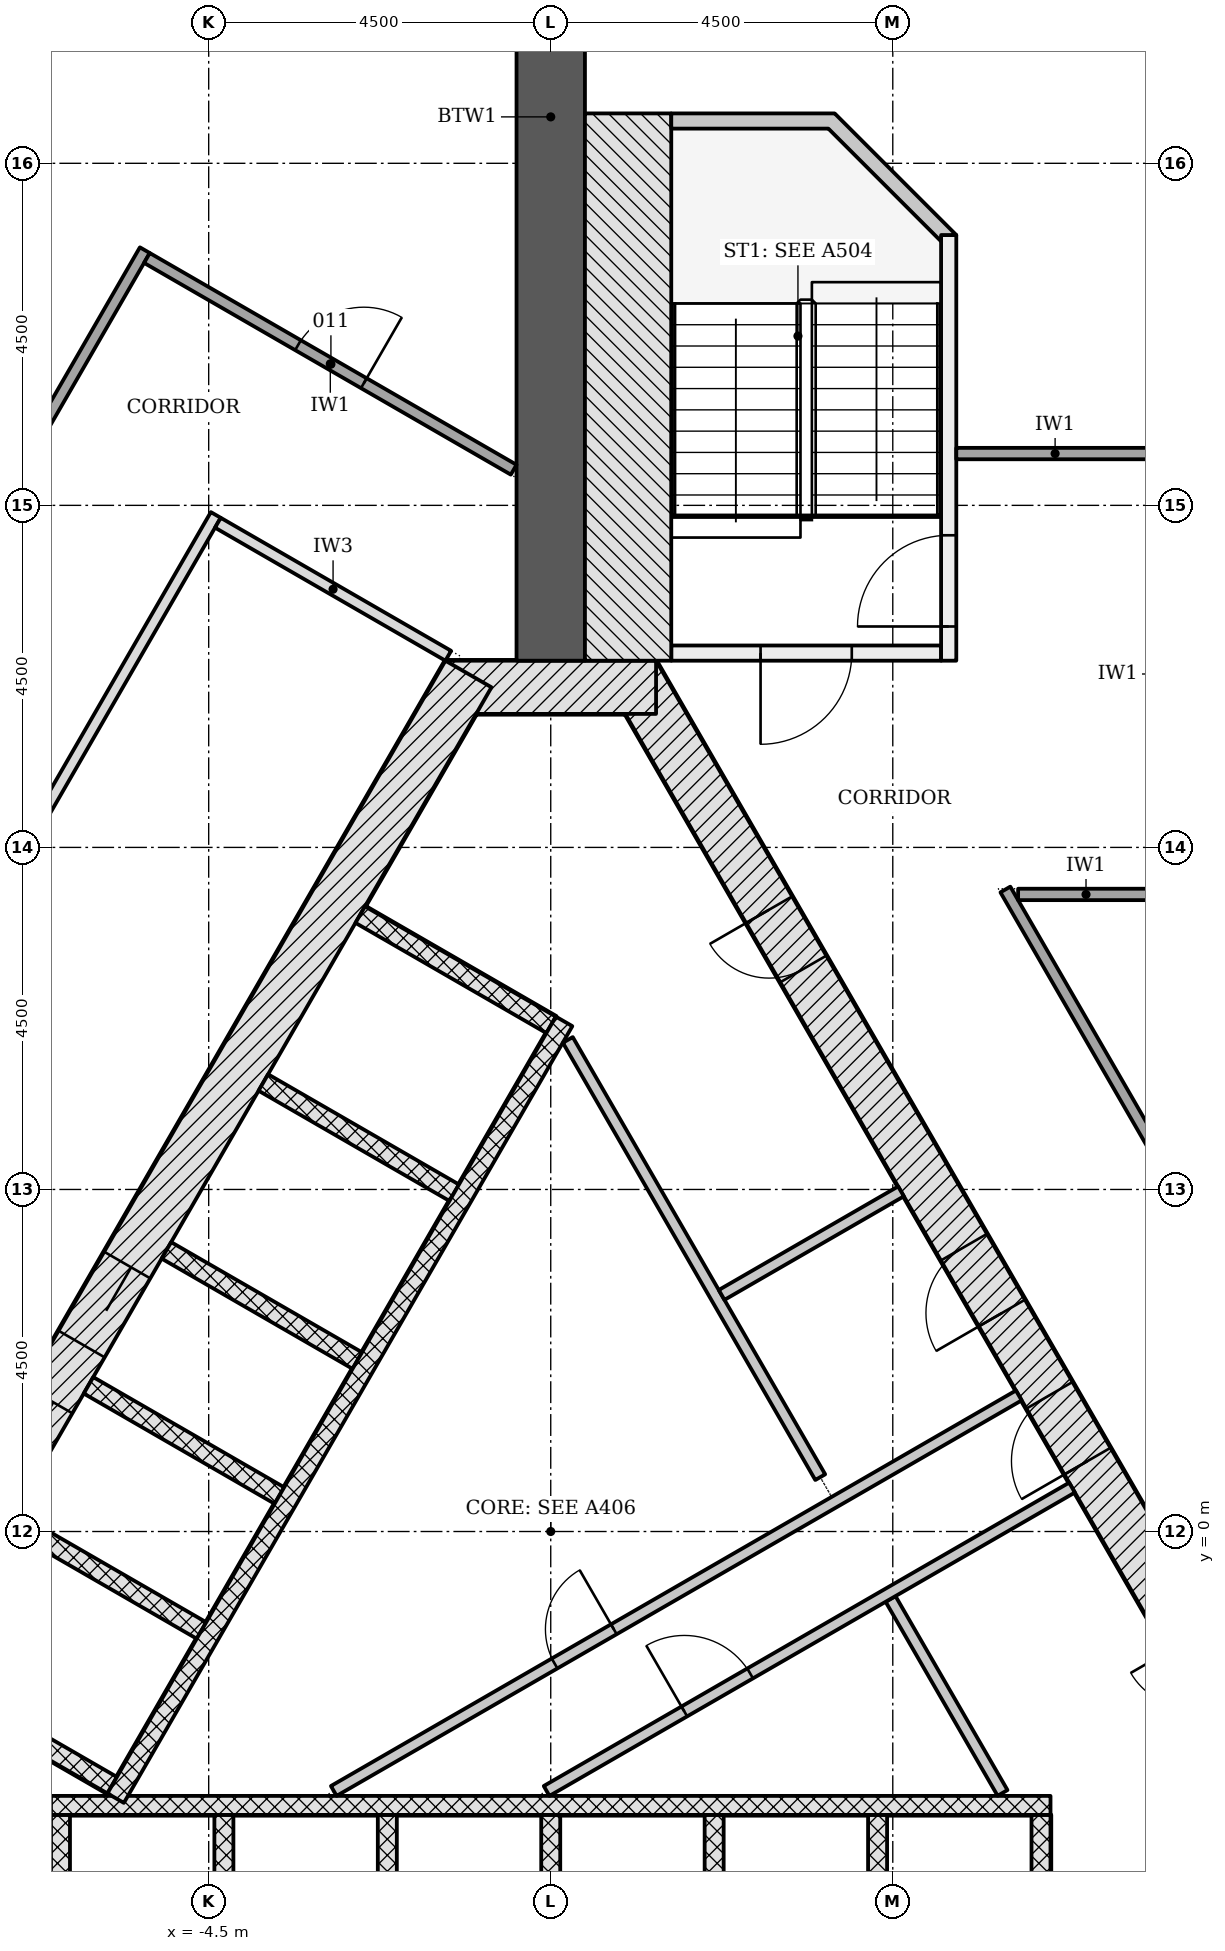
"""IFC4 building model, lengths in metres.
Left out: names, types, materials, properties, quantities, classifications, styles, units other than length and angle.
Written with IfcOpenShell. Run it as: python <this file> out.ifc"""

import sys

from ifc_helpers import new_model, si_unit, direction, frame, frame_2d, origin, place, context, subcontext, project, spatial, polyline, rectangle, outline, extrude, element, fill, save


model = new_model("IFC4")
c1 = context("Model", 3, precision=1e-05, world=origin(), true_north=direction((0.0, 1.0)))
c2 = subcontext(c1, "Body", "Model", "MODEL_VIEW")
j1 = project(units=[si_unit("LENGTHUNIT", "METRE"), si_unit("PLANEANGLEUNIT", "RADIAN")], contexts=[c1])
p1 = place(None, origin())
s1 = spatial("IfcSite", under=j1, at=p1, CompositionType="ELEMENT")
p2 = place(p1, origin())
s2 = spatial("IfcBuilding", under=s1, at=p2, CompositionType="ELEMENT")
p3 = place(p2, frame((0.0, 0.0, 34.8)))
s3 = spatial("IfcBuildingStorey", under=s2, at=p3, CompositionType="ELEMENT", Elevation=34.8)
p4 = place(p3, frame((10.311, -4.703, -0.2), z_axis=(0.0, 0.0, 1.0), x_axis=(-0.500001446645, 0.866024568562, 0.0)))
e1 = element("IfcWall", 1, at=p4, inside=s3, PredefinedType="SHEAR", context=c2, shape_type="SweptSolid", body=[
    extrude(rectangle(XDim=18.458, YDim=0.7, at=frame_2d((9.229, 0.0))), origin(), (0.0, 0.0, 1.0), 3.6),
])
p5 = place(p4, frame((6.5, 0.0, 0.2)))
e2 = element("IfcOpeningElement", 2, at=p5, cuts=e1, PredefinedType="OPENING", context=c2, shape_type="SweptSolid", body=[
    extrude(rectangle(XDim=1.0, YDim=2.1, at=frame_2d((0.5, 1.05))), frame((0.0, 0.36, 0.0), z_axis=(0.0, -1.0, 0.0), x_axis=(1.0, 0.0, 0.0)), (0.0, 0.0, 1.0), 0.72),
])
p6 = place(p4, frame((2.902, 0.0, 0.2)))
e3 = element("IfcOpeningElement", 3, at=p6, cuts=e1, PredefinedType="OPENING", context=c2, shape_type="SweptSolid", body=[
    extrude(rectangle(XDim=0.9, YDim=2.1, at=frame_2d((0.45, 1.05))), frame((0.0, 0.36, 0.0), z_axis=(0.0, -1.0, 0.0), x_axis=(1.0, 0.0, 0.0)), (0.0, 0.0, 1.0), 0.72),
])
p7 = place(p4, frame((8.75, 0.0, 0.2)))
e4 = element("IfcOpeningElement", 4, at=p7, cuts=e1, PredefinedType="OPENING", context=c2, shape_type="SweptSolid", body=[
    extrude(rectangle(XDim=1.0, YDim=2.1, at=frame_2d((0.5, 1.05))), frame((0.0, 0.36, 0.0), z_axis=(0.0, -1.0, 0.0), x_axis=(1.0, 0.0, 0.0)), (0.0, 0.0, 1.0), 0.72),
])
p8 = place(p4, frame((13.977, 0.0, 0.2)))
e5 = element("IfcOpeningElement", 5, at=p8, cuts=e1, PredefinedType="OPENING", context=c2, shape_type="SweptSolid", body=[
    extrude(rectangle(XDim=0.9, YDim=2.1, at=frame_2d((0.45, 1.05))), frame((0.0, 0.36, 0.0), z_axis=(0.0, -1.0, 0.0), x_axis=(1.0, 0.0, 0.0)), (0.0, 0.0, 1.0), 0.72),
])
p9 = place(p3, frame((1.386, 11.106, -0.2), z_axis=(0.0, 0.0, 1.0), x_axis=(-1.0, 0.0, 0.0)))
e6 = element("IfcWall", 6, at=p9, inside=s3, PredefinedType="SHEAR", context=c2, shape_type="SweptSolid", body=[
    extrude(rectangle(XDim=2.771, YDim=0.7, at=frame_2d((1.386, 0.0))), origin(), (0.0, 0.0, 1.0), 3.6),
])
p10 = place(p3, frame((-1.083, 11.281, -0.2), z_axis=(0.0, 0.0, 1.0), x_axis=(-0.500001446645, -0.866024568562, 0.0)))
e7 = element("IfcWall", 7, at=p10, inside=s3, PredefinedType="SHEAR", context=c2, shape_type="SweptSolid", body=[
    extrude(rectangle(XDim=18.458, YDim=0.7, at=frame_2d((9.229, 0.0))), origin(), (0.0, 0.0, 1.0), 3.6),
])
p11 = place(p10, frame((8.979, 0.0, 0.2)))
e8 = element("IfcOpeningElement", 8, at=p11, cuts=e7, PredefinedType="OPENING", context=c2, shape_type="SweptSolid", body=[
    extrude(rectangle(XDim=1.2, YDim=2.1, at=frame_2d((0.6, 1.05))), frame((0.0, 0.36, 0.0), z_axis=(0.0, -1.0, 0.0), x_axis=(1.0, 0.0, 0.0)), (0.0, 0.0, 1.0), 0.72),
])
p12 = place(p10, frame((11.029, 0.0, 0.2)))
e9 = element("IfcOpeningElement", 9, at=p12, cuts=e7, PredefinedType="OPENING", context=c2, shape_type="SweptSolid", body=[
    extrude(rectangle(XDim=1.2, YDim=2.1, at=frame_2d((0.6, 1.05))), frame((0.0, 0.36, 0.0), z_axis=(0.0, -1.0, 0.0), x_axis=(1.0, 0.0, 0.0)), (0.0, 0.0, 1.0), 0.72),
])
p13 = place(p3, frame((0.0, 11.456, -0.2), z_axis=(0.0, 0.0, 1.0), x_axis=(0.0, 1.0, 0.0)))
e10 = element("IfcWall", 10, at=p13, inside=s3, PredefinedType="SHEAR", context=c2, shape_type="SweptSolid", body=[
    extrude(rectangle(XDim=14.309, YDim=0.9, at=frame_2d((7.154, 0.0))), origin(), (0.0, 0.0, 1.0), 3.6),
])
for number, where, z_axis, x_axis in (
    (11, (-6.45, -6.228, -0.2), (0.0, 0.0, 1.0), (0.0, 1.0, 0.0)),
    (12, (-4.3, -6.228, -0.2), (0.0, 0.0, 1.0), (0.0, 1.0, 0.0)),
    (13, (-2.15, -6.228, -0.2), (0.0, 0.0, 1.0), (0.0, 1.0, 0.0)),
    (14, (0.0, -6.228, -0.2), (0.0, 0.0, 1.0), (0.0, 1.0, 0.0)),
    (15, (2.15, -6.228, -0.2), (0.0, 0.0, 1.0), (0.0, 1.0, 0.0)),
    (16, (4.3, -6.228, -0.2), (0.0, 0.0, 1.0), (0.0, 1.0, 0.0)),
    (17, (6.45, -6.228, -0.2), (0.0, 0.0, 1.0), (0.0, 1.0, 0.0)),
):
    element("IfcWall", number, at=place(p3, frame(where, z_axis=z_axis, x_axis=x_axis)), inside=s3, PredefinedType="PARTITIONING", context=c2, shape_type="SweptSolid", body=[
        extrude(rectangle(XDim=2.5, YDim=0.25, at=frame_2d((1.25, 0.0))), origin(), (0.0, 0.0, 1.0), 3.6),
    ])
p14 = place(p3, frame((-6.575, -3.603, 0.0), z_axis=(0.0, 0.0, 1.0), x_axis=(1.0, 0.0, 0.0)))
e18 = element("IfcWall", 18, at=p14, inside=s3, PredefinedType="PARTITIONING", context=c2, shape_type="SweptSolid", body=[
    extrude(rectangle(XDim=13.15, YDim=0.25, at=frame_2d((6.575, 0.0))), origin(), (0.0, 0.0, 1.0), 3.4),
])
p15 = place(p3, frame((-2.506, 8.115, -0.2), z_axis=(0.0, 0.0, 1.0), x_axis=(0.865996321171, -0.50005036918, 0.0)))
e19 = element("IfcWall", 19, at=p15, inside=s3, PredefinedType="PARTITIONING", context=c2, shape_type="SweptSolid", body=[
    extrude(rectangle(XDim=2.9, YDim=0.25, at=frame_2d((1.45, 0.0))), origin(), (0.0, 0.0, 1.0), 3.6),
])
for number, where, z_axis, x_axis in (
    (20, (-3.781, 5.907, -0.2), (0.0, 0.0, 1.0), (0.866, -0.5, 0.0)),
    (21, (-5.056, 3.699, -0.2), (0.0, 0.0, 1.0), (0.866, -0.5, 0.0)),
    (22, (-6.081, 1.923, -0.2), (0.0, 0.0, 1.0), (0.866, -0.5, 0.0)),
    (23, (-7.106, 0.148, -0.2), (0.0, 0.0, 1.0), (0.866, -0.5, 0.0)),
    (24, (-8.281, -1.887, -0.2), (0.0, 0.0, 1.0), (0.866, -0.5, 0.0)),
):
    element("IfcWall", number, at=place(p3, frame(where, z_axis=z_axis, x_axis=x_axis)), inside=s3, PredefinedType="PARTITIONING", context=c2, shape_type="SweptSolid", body=[
        extrude(rectangle(XDim=2.9, YDim=0.25, at=frame_2d((1.45, 0.0))), origin(), (0.0, 0.0, 1.0), 3.6),
    ])
p16 = place(p3, frame((0.176, 6.711, 0.0), z_axis=(0.0, 0.0, 1.0), x_axis=(-0.500004227369, -0.866022963098, 0.0)))
e25 = element("IfcWall", 25, at=p16, inside=s3, PredefinedType="PARTITIONING", context=c2, shape_type="SweptSolid", body=[
    extrude(rectangle(XDim=11.8, YDim=0.25, at=frame_2d((5.9, 0.0))), origin(), (0.0, 0.0, 1.0), 3.4),
])
p17 = place(p3, frame((-2.854, -3.413, 0.0), z_axis=(0.0, 0.0, 1.0), x_axis=(0.866030102318, 0.499991861813, 0.0)))
e26 = element("IfcWall", 26, at=p17, inside=s3, PredefinedType="PARTITIONING", context=c2, shape_type="SweptSolid", body=[
    extrude(rectangle(XDim=10.407, YDim=0.15, at=frame_2d((5.204, 0.0))), origin(), (0.0, 0.0, 1.0), 3.4),
])
p18 = place(p17, frame((3.354, 0.0, 0.0)))
e27 = element("IfcOpeningElement", 27, at=p18, cuts=e26, PredefinedType="OPENING", context=c2, shape_type="SweptSolid", body=[
    extrude(rectangle(XDim=0.9, YDim=2.1, at=frame_2d((0.45, 1.05))), frame((0.0, 0.085, 0.0), z_axis=(0.0, -1.0, 0.0), x_axis=(1.0, 0.0, 0.0)), (0.0, 0.0, 1.0), 0.17),
])
p19 = place(p3, frame((5.944, -3.439, 0.0), z_axis=(0.0, 0.0, 1.0), x_axis=(-0.499997367627, 0.86602692358, 0.0)))
e28 = element("IfcWall", 28, at=p19, inside=s3, PredefinedType="PARTITIONING", context=c2, shape_type="SweptSolid", body=[
    extrude(rectangle(XDim=2.947, YDim=0.15, at=frame_2d((1.473, 0.0))), origin(), (0.0, 0.0, 1.0), 3.4),
])
p20 = place(p3, frame((-0.054, -3.413, 0.0), z_axis=(0.0, 0.0, 1.0), x_axis=(0.866026668906, 0.499997808738, 0.0)))
e29 = element("IfcWall", 29, at=p20, inside=s3, PredefinedType="PARTITIONING", context=c2, shape_type="SweptSolid", body=[
    extrude(rectangle(XDim=7.982, YDim=0.15, at=frame_2d((3.991, 0.0))), origin(), (0.0, 0.0, 1.0), 3.4),
])
p21 = place(p20, frame((2.092, 0.0, 0.0)))
e30 = element("IfcOpeningElement", 30, at=p21, cuts=e29, PredefinedType="OPENING", context=c2, shape_type="SweptSolid", body=[
    extrude(rectangle(XDim=1.0, YDim=2.1, at=frame_2d((0.5, 1.05))), frame((0.0, 0.085, 0.0), z_axis=(0.0, -1.0, 0.0), x_axis=(1.0, 0.0, 0.0)), (0.0, 0.0, 1.0), 0.17),
])
p22 = place(p3, frame((3.546, 0.715, 0.0), z_axis=(0.0, 0.0, 1.0), x_axis=(-0.50002895357, 0.866008686788, 0.0)))
e31 = element("IfcWall", 31, at=p22, inside=s3, PredefinedType="PARTITIONING", context=c2, shape_type="SweptSolid", body=[
    extrude(rectangle(XDim=6.642, YDim=0.15, at=frame_2d((3.321, 0.0))), origin(), (0.0, 0.0, 1.0), 3.4),
])
p23 = place(p3, frame((2.248, 3.112, 0.0), z_axis=(0.0, 0.0, 1.0), x_axis=(0.866012511928, 0.500022328685, 0.0)))
e32 = element("IfcWall", 32, at=p23, inside=s3, PredefinedType="PARTITIONING", context=c2, shape_type="SweptSolid", body=[
    extrude(rectangle(XDim=2.725, YDim=0.15, at=frame_2d((1.363, 0.0))), origin(), (0.0, 0.0, 1.0), 3.4),
])
p24 = place(p3, frame((5.135, 11.556, -0.2), z_axis=(0.0, 0.0, 1.0), x_axis=(-1.0, 0.0, 0.0)))
e33 = element("IfcWall", 33, at=p24, inside=s3, PredefinedType="SHEAR", context=c2, shape_type="SweptSolid", body=[
    extrude(rectangle(XDim=3.55, YDim=0.2, at=frame_2d((1.775, 0.0))), origin(), (0.0, 0.0, 1.0), 3.6),
])
p25 = place(p24, frame((1.175, 0.0, 0.2)))
e34 = element("IfcOpeningElement", 34, at=p25, cuts=e33, PredefinedType="OPENING", context=c2, shape_type="SweptSolid", body=[
    extrude(rectangle(XDim=1.2, YDim=2.1, at=frame_2d((0.6, 1.05))), frame((0.0, 0.11, 0.0), z_axis=(0.0, -1.0, 0.0), x_axis=(1.0, 0.0, 0.0)), (0.0, 0.0, 1.0), 0.22),
])
p26 = place(p3, frame((5.236, 11.456, -0.2), z_axis=(0.0, 0.0, 1.0), x_axis=(0.0, 1.0, 0.0)))
e35 = element("IfcWall", 35, at=p26, inside=s3, PredefinedType="SHEAR", context=c2, shape_type="SweptSolid", body=[
    extrude(rectangle(XDim=5.6, YDim=0.2, at=frame_2d((2.8, 0.0))), origin(), (0.0, 0.0, 1.0), 3.6),
])
p27 = place(p26, frame((0.45, 0.0, 0.2)))
e36 = element("IfcOpeningElement", 36, at=p27, cuts=e35, PredefinedType="OPENING", context=c2, shape_type="SweptSolid", body=[
    extrude(rectangle(XDim=1.2, YDim=2.1, at=frame_2d((0.6, 1.05))), frame((0.0, 0.11, 0.0), z_axis=(0.0, -1.0, 0.0), x_axis=(1.0, 0.0, 0.0)), (0.0, 0.0, 1.0), 0.22),
])
p28 = place(p3, frame((1.018, 11.456, -0.2), z_axis=(0.0, 0.0, 1.0), x_axis=(0.0, 1.0, 0.0)))
e37 = element("IfcWall", 37, at=p28, inside=s3, PredefinedType="SHEAR", context=c2, shape_type="SweptSolid", body=[
    extrude(rectangle(XDim=7.2, YDim=1.136, at=frame_2d((3.6, 0.0))), origin(), (0.0, 0.0, 1.0), 3.6),
])
p29 = place(p3, frame((0.0, 0.0, -0.2)))
e38 = element("IfcWall", 38, at=p29, inside=s3, PredefinedType="SHEAR", context=c2, shape_type="SweptSolid", body=[
    extrude(outline(polyline([(5.336, 17.056), (3.736, 18.656), (1.586, 18.656), (1.586, 18.456), (3.653, 18.456), (5.135, 16.974), (5.135, 17.056), (5.135, 17.056), (5.135, 17.056), (5.135, 17.056), (5.135, 17.056), (5.135, 17.056), (5.135, 17.056), (5.135, 17.056), (5.135, 17.056), (5.135, 17.056), (5.135, 17.056), (5.135, 17.056), (5.135, 17.056), (5.135, 17.056), (5.135, 17.056), (5.135, 17.056), (5.135, 17.056), (5.336, 17.056)])), origin(), (0.0, 0.0, 1.0), 3.6),
])
p30 = place(p3, frame((-17.208, -3.699, 0.0), z_axis=(0.0, 0.0, 1.0), x_axis=(0.499997567621, 0.866026808115, 0.0)))
e39 = element("IfcWall", 39, at=p30, inside=s3, PredefinedType="PARTITIONING", context=c2, shape_type="SweptSolid", body=[
    extrude(rectangle(XDim=23.736, YDim=0.15, at=frame_2d((11.868, 0.0))), origin(), (0.0, 0.0, 1.0), 2.768),
])
p31 = place(p30, frame((19.07, 0.0, 0.0)))
e40 = element("IfcOpeningElement", 40, at=p31, cuts=e39, PredefinedType="OPENING", context=c2, shape_type="SweptSolid", body=[
    extrude(rectangle(XDim=1.1, YDim=2.1, at=frame_2d((0.55, 1.05))), frame((0.0, 0.085, 0.0), z_axis=(0.0, -1.0, 0.0), x_axis=(1.0, 0.0, 0.0)), (0.0, 0.0, 1.0), 0.17),
])
p32 = place(p30, frame((7.225, 0.0, 0.0)))
e41 = element("IfcOpeningElement", 41, at=p32, cuts=e39, PredefinedType="OPENING", context=c2, shape_type="SweptSolid", body=[
    extrude(rectangle(XDim=1.5, YDim=2.1, at=frame_2d((0.75, 1.05))), frame((0.0, 0.085, 0.0), z_axis=(0.0, -1.0, 0.0), x_axis=(1.0, 0.0, 0.0)), (0.0, 0.0, 1.0), 0.17),
])
p33 = place(p3, frame((-4.407, 13.374, 0.0), z_axis=(0.0, 0.0, 1.0), x_axis=(-0.499997181693, -0.866027030928, 0.0)))
e42 = element("IfcWall", 42, at=p33, inside=s3, PredefinedType="PARTITIONING", context=c2, shape_type="SweptSolid", body=[
    extrude(rectangle(XDim=16.77, YDim=0.15, at=frame_2d((8.385, 0.0))), origin(), (0.0, 0.0, 1.0), 2.768),
])
p34 = place(p33, frame((8.879, 0.0, 0.0)))
e43 = element("IfcOpeningElement", 43, at=p34, cuts=e42, PredefinedType="OPENING", context=c2, shape_type="SweptSolid", body=[
    extrude(rectangle(XDim=1.0, YDim=2.1, at=frame_2d((0.5, 1.05))), frame((0.0, 0.085, 0.0), z_axis=(0.0, -1.0, 0.0), x_axis=(1.0, 0.0, 0.0)), (0.0, 0.0, 1.0), 0.17),
])
p35 = place(p3, frame((5.981, 8.446, 0.0), z_axis=(0.0, 0.0, 1.0), x_axis=(0.499996620721, -0.866027354803, 0.0)))
e44 = element("IfcWall", 44, at=p35, inside=s3, PredefinedType="PARTITIONING", context=c2, shape_type="SweptSolid", body=[
    extrude(rectangle(XDim=15.057, YDim=0.15, at=frame_2d((7.528, 0.0))), origin(), (0.0, 0.0, 1.0), 2.768),
])
p36 = place(p35, frame((11.311, 0.0, 0.0)))
e45 = element("IfcOpeningElement", 45, at=p36, cuts=e44, PredefinedType="OPENING", context=c2, shape_type="SweptSolid", body=[
    extrude(rectangle(XDim=1.0, YDim=2.1, at=frame_2d((0.5, 1.05))), frame((0.0, 0.085, 0.0), z_axis=(0.0, -1.0, 0.0), x_axis=(1.0, 0.0, 0.0)), (0.0, 0.0, 1.0), 0.17),
])
p37 = place(p35, frame((4.754, 0.0, 0.0)))
e46 = element("IfcOpeningElement", 46, at=p37, cuts=e44, PredefinedType="OPENING", context=c2, shape_type="SweptSolid", body=[
    extrude(rectangle(XDim=1.1, YDim=2.1, at=frame_2d((0.55, 1.05))), frame((0.0, 0.085, 0.0), z_axis=(0.0, -1.0, 0.0), x_axis=(1.0, 0.0, 0.0)), (0.0, 0.0, 1.0), 0.17),
])
p38 = place(p3, frame((-5.312, 16.755, 0.0), z_axis=(0.0, 0.0, 1.0), x_axis=(0.866028693448, -0.499994302092, 0.0)))
e47 = element("IfcWall", 47, at=p38, inside=s3, PredefinedType="PARTITIONING", context=c2, shape_type="SweptSolid", body=[
    extrude(rectangle(XDim=5.571, YDim=0.15, at=frame_2d((2.786, 0.0))), origin(), (0.0, 0.0, 1.0), 3.4),
])
p39 = place(p38, frame((2.295, 0.0, 0.0)))
e48 = element("IfcOpeningElement", 48, at=p39, cuts=e47, PredefinedType="OPENING", context=c2, shape_type="SweptSolid", body=[
    extrude(rectangle(XDim=1.0, YDim=2.1, at=frame_2d((0.5, 1.05))), frame((0.0, 0.085, 0.0), z_axis=(0.0, -1.0, 0.0), x_axis=(1.0, 0.0, 0.0)), (0.0, 0.0, 1.0), 0.17),
])
p40 = place(p3, frame((-4.379, 13.271, 0.0), z_axis=(0.0, 0.0, 1.0), x_axis=(0.866019471182, -0.500010275428, 0.0)))
e49 = element("IfcWall", 49, at=p40, inside=s3, PredefinedType="PARTITIONING", context=c2, shape_type="SweptSolid", body=[
    extrude(rectangle(XDim=3.5, YDim=0.15, at=frame_2d((1.75, 0.0))), origin(), (0.0, 0.0, 1.0), 3.4),
])
p41 = place(p3, frame((5.336, 14.181, 0.0), z_axis=(0.0, 0.0, 1.0), x_axis=(1.0, 0.0, 0.0)))
e50 = element("IfcWall", 50, at=p41, inside=s3, PredefinedType="PARTITIONING", context=c2, shape_type="SweptSolid", body=[
    extrude(rectangle(XDim=2.6, YDim=0.15, at=frame_2d((1.3, 0.0))), origin(), (0.0, 0.0, 1.0), 2.923),
])
p42 = place(p3, frame((6.149, 8.381, 0.0), z_axis=(0.0, 0.0, 1.0), x_axis=(1.0, 0.0, 0.0)))
e51 = element("IfcWall", 51, at=p42, inside=s3, PredefinedType="PARTITIONING", context=c2, shape_type="SweptSolid", body=[
    extrude(rectangle(XDim=1.787, YDim=0.15, at=frame_2d((0.894, 0.0))), origin(), (0.0, 0.0, 1.0), 2.768),
])
p43 = place(p11, origin())
e52 = element("IfcDoor", 52, at=p43, inside=s3, OperationType="DOUBLE_DOOR_SLIDING", PredefinedType="DOOR", context=c2, shape_type="SweptSolid", body=[
    extrude(rectangle(XDim=1.2, YDim=2.1, at=frame_2d((0.6, 1.05))), frame((0.0, 0.025, 0.0), z_axis=(0.0, -1.0, 0.0), x_axis=(1.0, 0.0, 0.0)), (0.0, 0.0, 1.0), 0.05),
])
fill(e8, e52)
p44 = place(p5, origin())
e53 = element("IfcDoor", 53, at=p44, inside=s3, OperationType="SINGLE_SWING_LEFT", PredefinedType="DOOR", context=c2, shape_type="SweptSolid", body=[
    extrude(rectangle(XDim=1.0, YDim=2.1, at=frame_2d((0.5, 1.05))), frame((0.0, 0.075, 0.0), z_axis=(0.0, -1.0, 0.0), x_axis=(1.0, 0.0, 0.0)), (0.0, 0.0, 1.0), 0.15),
])
fill(e2, e53)
p45 = place(p7, origin())
e54 = element("IfcDoor", 54, at=p45, inside=s3, OperationType="SINGLE_SWING_LEFT", PredefinedType="DOOR", context=c2, shape_type="SweptSolid", body=[
    extrude(rectangle(XDim=1.0, YDim=2.1, at=frame_2d((0.5, 1.05))), frame((0.0, 0.075, 0.0), z_axis=(0.0, -1.0, 0.0), x_axis=(1.0, 0.0, 0.0)), (0.0, 0.0, 1.0), 0.15),
])
fill(e4, e54)
p46 = place(p8, origin())
e55 = element("IfcDoor", 55, at=p46, inside=s3, OperationType="SINGLE_SWING_RIGHT", PredefinedType="DOOR", context=c2, shape_type="SweptSolid", body=[
    extrude(rectangle(XDim=0.9, YDim=2.1, at=frame_2d((0.45, 1.05))), frame((0.0, 0.075, 0.0), z_axis=(0.0, -1.0, 0.0), x_axis=(1.0, 0.0, 0.0)), (0.0, 0.0, 1.0), 0.15),
])
fill(e5, e55)
p47 = place(p21, origin())
e56 = element("IfcDoor", 56, at=p47, inside=s3, OperationType="SINGLE_SWING_LEFT", PredefinedType="DOOR", context=c2, shape_type="SweptSolid", body=[
    extrude(rectangle(XDim=1.0, YDim=2.1, at=frame_2d((0.5, 1.05))), frame((0.0, 0.025, 0.0), z_axis=(0.0, -1.0, 0.0), x_axis=(1.0, 0.0, 0.0)), (0.0, 0.0, 1.0), 0.05),
])
fill(e30, e56)
p48 = place(p18, origin())
e57 = element("IfcDoor", 57, at=p48, inside=s3, OperationType="SINGLE_SWING_RIGHT", PredefinedType="DOOR", context=c2, shape_type="SweptSolid", body=[
    extrude(rectangle(XDim=0.9, YDim=2.1, at=frame_2d((0.45, 1.05))), frame((0.0, 0.025, 0.0), z_axis=(0.0, -1.0, 0.0), x_axis=(1.0, 0.0, 0.0)), (0.0, 0.0, 1.0), 0.05),
])
fill(e27, e57)
p49 = place(p25, origin())
e58 = element("IfcDoor", 58, at=p49, inside=s3, OperationType="SINGLE_SWING_RIGHT", PredefinedType="DOOR", context=c2, shape_type="SweptSolid", body=[
    extrude(rectangle(XDim=1.2, YDim=2.1, at=frame_2d((0.6, 1.05))), frame((0.0, 0.025, 0.0), z_axis=(0.0, -1.0, 0.0), x_axis=(1.0, 0.0, 0.0)), (0.0, 0.0, 1.0), 0.05),
])
fill(e34, e58)
p50 = place(p27, origin())
e59 = element("IfcDoor", 59, at=p50, inside=s3, OperationType="SINGLE_SWING_LEFT", PredefinedType="DOOR", context=c2, shape_type="SweptSolid", body=[
    extrude(rectangle(XDim=1.2, YDim=2.1, at=frame_2d((0.6, 1.05))), frame((0.0, 0.025, 0.0), z_axis=(0.0, -1.0, 0.0), x_axis=(1.0, 0.0, 0.0)), (0.0, 0.0, 1.0), 0.05),
])
fill(e36, e59)
p51 = place(p39, origin())
e60 = element("IfcDoor", 60, at=p51, inside=s3, OperationType="SINGLE_SWING_RIGHT", PredefinedType="DOOR", context=c2, shape_type="SweptSolid", body=[
    extrude(rectangle(XDim=1.0, YDim=2.1, at=frame_2d((0.5, 1.05))), frame((0.0, 0.025, 0.0), z_axis=(0.0, -1.0, 0.0), x_axis=(1.0, 0.0, 0.0)), (0.0, 0.0, 1.0), 0.05),
])
fill(e48, e60)
save(model, sys.argv[1])
